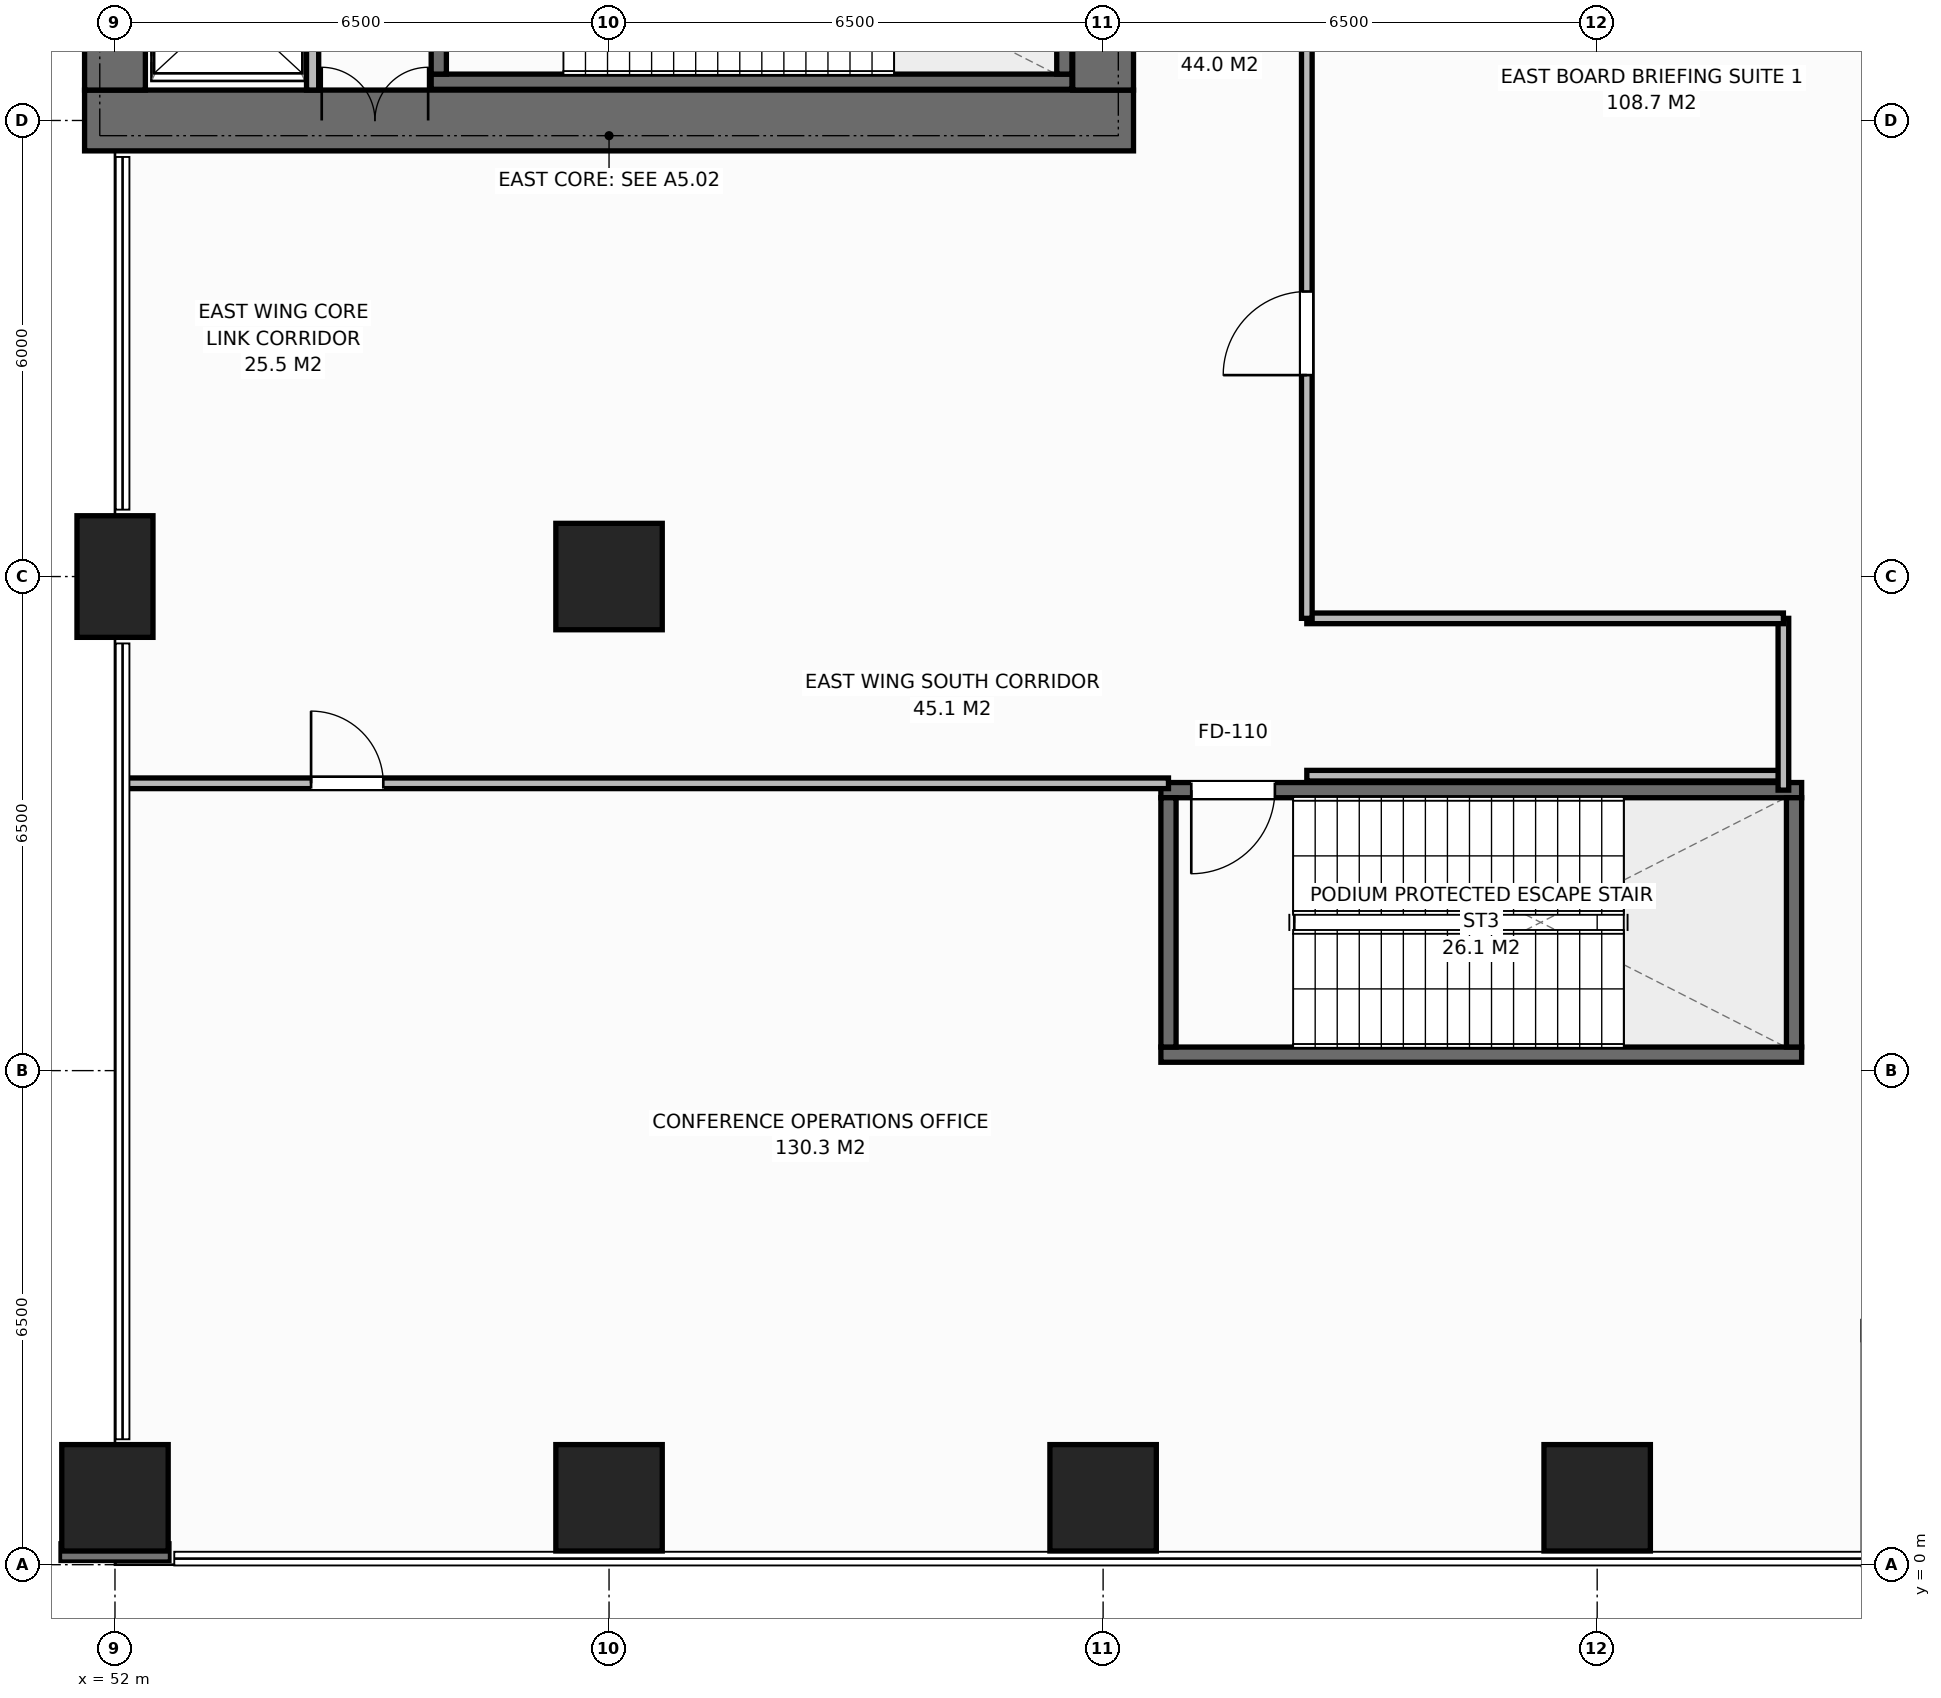
"""IFC4 building model, lengths in metres.
Left out: names, types, materials, properties, quantities, classifications, styles, units other than length and angle.
Written with IfcOpenShell. Run it as: python <this file> out.ifc"""

import sys

from ifc_helpers import new_model, si_unit, direction, frame, frame_2d, origin, origin_2d, place, context, subcontext, project, spatial, rectangle, extrude, element, fill, save


model = new_model("IFC4")
c1 = context("Model", 3, precision=1e-05, world=origin(), true_north=direction((0.0, 1.0)))
c2 = subcontext(c1, "Body", "Model", "MODEL_VIEW")
j1 = project(units=[si_unit("LENGTHUNIT", "METRE"), si_unit("PLANEANGLEUNIT", "RADIAN")], contexts=[c1])
p1 = place(None, origin())
s1 = spatial("IfcSite", under=j1, at=p1, CompositionType="ELEMENT")
p2 = place(p1, origin())
s2 = spatial("IfcBuilding", under=s1, at=p2, CompositionType="ELEMENT")
p3 = place(p2, frame((0.0, 0.0, 6.0)))
s3 = spatial("IfcBuildingStorey", under=s2, at=p3, CompositionType="ELEMENT", Elevation=6.0)
p4 = place(p3, frame((51.6, 19.0, 0.0), z_axis=(0.0, 0.0, 1.0), x_axis=(1.0, 0.0, 0.0)))
e1 = element("IfcWall", 1, at=p4, inside=s3, PredefinedType="SHEAR", context=c2, shape_type="SweptSolid", body=[
    extrude(rectangle(XDim=13.8, YDim=0.8, at=frame_2d((6.9, 0.0))), origin(), (0.0, 0.0, 1.0), 5.5),
])
p5 = place(p4, frame((3.12, 0.0, 0.0)))
e2 = element("IfcOpeningElement", 2, at=p5, cuts=e1, PredefinedType="OPENING", context=c2, shape_type="SweptSolid", body=[
    extrude(rectangle(XDim=1.4, YDim=2.2, at=frame_2d((0.7, 1.1))), frame((0.0, 0.41, 0.0), z_axis=(0.0, -1.0, 0.0), x_axis=(1.0, 0.0, 0.0)), (0.0, 0.0, 1.0), 0.82),
])
p6 = place(p3, frame((52.0, 19.4, 0.0), z_axis=(0.0, 0.0, 1.0), x_axis=(0.0, 1.0, 0.0)))
e3 = element("IfcWall", 3, at=p6, inside=s3, PredefinedType="SHEAR", context=c2, shape_type="SweptSolid", body=[
    extrude(rectangle(XDim=13.2, YDim=0.8, at=frame_2d((6.6, 0.0))), origin(), (0.0, 0.0, 1.0), 5.5),
])
p7 = place(p3, frame((65.0, 19.4, 0.0), z_axis=(0.0, 0.0, 1.0), x_axis=(0.0, 1.0, 0.0)))
e4 = element("IfcWall", 4, at=p7, inside=s3, PredefinedType="SHEAR", context=c2, shape_type="SweptSolid", body=[
    extrude(rectangle(XDim=13.2, YDim=0.8, at=frame_2d((6.6, 0.0))), origin(), (0.0, 0.0, 1.0), 5.5),
])
p8 = place(p7, frame((8.05, 0.0, 0.0)))
e5 = element("IfcOpeningElement", 5, at=p8, cuts=e4, PredefinedType="OPENING", context=c2, shape_type="SweptSolid", body=[
    extrude(rectangle(XDim=1.3, YDim=2.2, at=frame_2d((0.65, 1.1))), frame((0.0, 0.41, 0.0), z_axis=(0.0, -1.0, 0.0), x_axis=(1.0, 0.0, 0.0)), (0.0, 0.0, 1.0), 0.82),
])
p9 = place(p3, frame((56.16, 19.51, 0.0), z_axis=(0.0, 0.0, 1.0), x_axis=(1.0, 0.0, 0.0)))
e6 = element("IfcWall", 6, at=p9, inside=s3, PredefinedType="SHEAR", context=c2, shape_type="SweptSolid", body=[
    extrude(rectangle(XDim=8.43, YDim=0.2, at=frame_2d((4.215, 0.0))), origin(), (0.0, 0.0, 1.0), 5.5),
])
for number, where, z_axis, x_axis in (
    (7, (56.26, 19.61, 0.0), (0.0, 0.0, 1.0), (0.0, 1.0, 0.0)),
    (8, (64.49, 19.61, 0.0), (0.0, 0.0, 1.0), (0.0, 1.0, 0.0)),
):
    element("IfcWall", number, at=place(p3, frame(where, z_axis=z_axis, x_axis=x_axis)), inside=s3, PredefinedType="SHEAR", context=c2, shape_type="SweptSolid", body=[
        extrude(rectangle(XDim=3.28, YDim=0.2, at=frame_2d((1.64, 0.0))), origin(), (0.0, 0.0, 1.0), 5.5),
    ])
p10 = place(p3, frame((65.76, 6.71, 0.0), z_axis=(0.0, 0.0, 1.0), x_axis=(1.0, 0.0, 0.0)))
e9 = element("IfcWall", 9, at=p10, inside=s3, PredefinedType="SHEAR", context=c2, shape_type="SweptSolid", body=[
    extrude(rectangle(XDim=8.43, YDim=0.2, at=frame_2d((4.215, 0.0))), origin(), (0.0, 0.0, 1.0), 5.5),
])
p11 = place(p3, frame((65.76, 10.19, 0.0), z_axis=(0.0, 0.0, 1.0), x_axis=(1.0, 0.0, 0.0)))
e10 = element("IfcWall", 10, at=p11, inside=s3, PredefinedType="SHEAR", context=c2, shape_type="SweptSolid", body=[
    extrude(rectangle(XDim=8.43, YDim=0.2, at=frame_2d((4.215, 0.0))), origin(), (0.0, 0.0, 1.0), 5.5),
])
p12 = place(p11, frame((0.4, 0.0, 0.0)))
e11 = element("IfcOpeningElement", 11, at=p12, cuts=e10, PredefinedType="OPENING", context=c2, shape_type="SweptSolid", body=[
    extrude(rectangle(XDim=1.1, YDim=2.15, at=frame_2d((0.55, 1.075))), frame((0.0, 0.11, 0.0), z_axis=(0.0, -1.0, 0.0), x_axis=(1.0, 0.0, 0.0)), (0.0, 0.0, 1.0), 0.22),
])
for number, where, z_axis, x_axis in (
    (12, (65.86, 6.81, 0.0), (0.0, 0.0, 1.0), (0.0, 1.0, 0.0)),
    (13, (74.09, 6.81, 0.0), (0.0, 0.0, 1.0), (0.0, 1.0, 0.0)),
):
    element("IfcWall", number, at=place(p3, frame(where, z_axis=z_axis, x_axis=x_axis)), inside=s3, PredefinedType="SHEAR", context=c2, shape_type="SweptSolid", body=[
        extrude(rectangle(XDim=3.28, YDim=0.2, at=frame_2d((1.64, 0.0))), origin(), (0.0, 0.0, 1.0), 5.5),
    ])
p13 = place(p3, frame((58.5, 13.0, 0.0), z_axis=(0.0, 0.0, 1.0), x_axis=(1.0, 0.0, 0.0)))
e14 = element("IfcColumn", 14, at=p13, inside=s3, PredefinedType="COLUMN", context=c2, shape_type="SweptSolid", body=[
    extrude(rectangle(XDim=1.4, YDim=1.4, at=origin_2d()), origin(), (0.0, 0.0, 1.0), 5.5),
])
p14 = place(p3, frame((52.0, 13.0, 0.0), z_axis=(0.0, 0.0, 1.0), x_axis=(1.0, 0.0, 0.0)))
e15 = element("IfcColumn", 15, at=p14, inside=s3, PredefinedType="PILASTER", context=c2, shape_type="SweptSolid", body=[
    extrude(rectangle(XDim=1.0, YDim=1.6, at=origin_2d()), origin(), (0.0, 0.0, 1.0), 5.5),
])
for number, where, z_axis, x_axis in (
    (16, (52.0, 0.88, 0.0), (0.0, 0.0, 1.0), (1.0, 0.0, 0.0)),
    (17, (58.5, 0.88, 0.0), (0.0, 0.0, 1.0), (1.0, 0.0, 0.0)),
    (18, (65.0, 0.88, 0.0), (0.0, 0.0, 1.0), (1.0, 0.0, 0.0)),
    (19, (71.5, 0.88, 0.0), (0.0, 0.0, 1.0), (1.0, 0.0, 0.0)),
):
    element("IfcColumn", number, at=place(p3, frame(where, z_axis=z_axis, x_axis=x_axis)), inside=s3, PredefinedType="COLUMN", context=c2, shape_type="SweptSolid", body=[
        extrude(rectangle(XDim=1.4, YDim=1.4, at=origin_2d()), origin(), (0.0, 0.0, 1.0), 5.5),
    ])
p15 = place(p3, frame((54.6, 19.4, 0.0), z_axis=(0.0, 0.0, 1.0), x_axis=(0.0, 1.0, 0.0)))
e20 = element("IfcWall", 20, at=p15, inside=s3, PredefinedType="STANDARD", context=c2, shape_type="SweptSolid", body=[
    extrude(rectangle(XDim=13.2, YDim=0.16, at=frame_2d((6.6, 0.0))), origin(), (0.0, 0.0, 1.0), 5.22),
])
p16 = place(p15, frame((0.55, 0.0, 0.0)))
e21 = element("IfcOpeningElement", 21, at=p16, cuts=e20, PredefinedType="OPENING", context=c2, shape_type="SweptSolid", body=[
    extrude(rectangle(XDim=1.1, YDim=2.2, at=frame_2d((0.55, 1.1))), frame((0.0, 0.09, 0.0), z_axis=(0.0, -1.0, 0.0), x_axis=(1.0, 0.0, 0.0)), (0.0, 0.0, 1.0), 0.18),
])
p17 = place(p15, frame((2.7, 0.0, 0.0)))
e22 = element("IfcOpeningElement", 22, at=p17, cuts=e20, PredefinedType="OPENING", context=c2, shape_type="SweptSolid", body=[
    extrude(rectangle(XDim=1.1, YDim=2.2, at=frame_2d((0.55, 1.1))), frame((0.0, 0.09, 0.0), z_axis=(0.0, -1.0, 0.0), x_axis=(1.0, 0.0, 0.0)), (0.0, 0.0, 1.0), 0.18),
])
p18 = place(p3, frame((67.68, 10.38, 0.0), z_axis=(0.0, 0.0, 1.0), x_axis=(1.0, 0.0, 0.0)))
e23 = element("IfcWall", 23, at=p18, inside=s3, PredefinedType="PARTITIONING", context=c2, shape_type="SweptSolid", body=[
    extrude(rectangle(XDim=6.27, YDim=0.14, at=frame_2d((3.135, 0.0))), origin(), (0.0, 0.0, 1.0), 5.22),
])
p19 = place(p3, frame((73.95, 10.19, 0.0), z_axis=(0.0, 0.0, 1.0), x_axis=(0.0, 1.0, 0.0)))
e24 = element("IfcWall", 24, at=p19, inside=s3, PredefinedType="PARTITIONING", context=c2, shape_type="SweptSolid", body=[
    extrude(rectangle(XDim=2.26, YDim=0.14, at=frame_2d((1.13, 0.0))), origin(), (0.0, 0.0, 1.0), 5.22),
])
p20 = place(p3, frame((67.68, 12.45, 0.0), z_axis=(0.0, 0.0, 1.0), x_axis=(1.0, 0.0, 0.0)))
e25 = element("IfcWall", 25, at=p20, inside=s3, PredefinedType="PARTITIONING", context=c2, shape_type="SweptSolid", body=[
    extrude(rectangle(XDim=6.27, YDim=0.14, at=frame_2d((3.135, 0.0))), origin(), (0.0, 0.0, 1.0), 5.22),
])
p21 = place(p3, frame((67.68, 12.45, 0.0), z_axis=(0.0, 0.0, 1.0), x_axis=(0.0, 1.0, 0.0)))
e26 = element("IfcWall", 26, at=p21, inside=s3, PredefinedType="PARTITIONING", context=c2, shape_type="SweptSolid", body=[
    extrude(rectangle(XDim=11.45, YDim=0.14, at=frame_2d((5.725, 0.0))), origin(), (0.0, 0.0, 1.0), 5.22),
])
p22 = place(p21, frame((3.2, 0.0, 0.0)))
e27 = element("IfcOpeningElement", 27, at=p22, cuts=e26, PredefinedType="OPENING", context=c2, shape_type="SweptSolid", body=[
    extrude(rectangle(XDim=1.1, YDim=2.15, at=frame_2d((0.55, 1.075))), frame((0.0, 0.08, 0.0), z_axis=(0.0, -1.0, 0.0), x_axis=(1.0, 0.0, 0.0)), (0.0, 0.0, 1.0), 0.16),
])
p23 = place(p3, frame((52.08, 10.28, 0.0), z_axis=(0.0, 0.0, 1.0), x_axis=(1.0, 0.0, 0.0)))
e28 = element("IfcWall", 28, at=p23, inside=s3, PredefinedType="PARTITIONING", context=c2, shape_type="SweptSolid", body=[
    extrude(rectangle(XDim=13.78, YDim=0.14, at=frame_2d((6.89, 0.0))), origin(), (0.0, 0.0, 1.0), 5.22),
])
p24 = place(p23, frame((2.5, 0.0, 0.0)))
e29 = element("IfcOpeningElement", 29, at=p24, cuts=e28, PredefinedType="OPENING", context=c2, shape_type="SweptSolid", body=[
    extrude(rectangle(XDim=0.95, YDim=2.15, at=frame_2d((0.475, 1.075))), frame((0.0, 0.08, 0.0), z_axis=(0.0, -1.0, 0.0), x_axis=(1.0, 0.0, 0.0)), (0.0, 0.0, 1.0), 0.16),
])
p25 = place(p5, origin())
e30 = element("IfcDoor", 30, at=p25, inside=s3, OperationType="DOUBLE_DOOR_SINGLE_SWING", PredefinedType="DOOR", context=c2, shape_type="SweptSolid", body=[
    extrude(rectangle(XDim=1.4, YDim=2.2, at=frame_2d((0.7, 1.1))), frame((0.0, 0.125, 0.0), z_axis=(0.0, -1.0, 0.0), x_axis=(1.0, 0.0, 0.0)), (0.0, 0.0, 1.0), 0.05),
])
fill(e2, e30)
p26 = place(p12, origin())
e31 = element("IfcDoor", 31, at=p26, inside=s3, OperationType="SINGLE_SWING_RIGHT", PredefinedType="DOOR", context=c2, shape_type="SweptSolid", body=[
    extrude(rectangle(XDim=1.1, YDim=2.15, at=frame_2d((0.55, 1.075))), frame((0.0, 0.025, 0.0), z_axis=(0.0, -1.0, 0.0), x_axis=(1.0, 0.0, 0.0)), (0.0, 0.0, 1.0), 0.05),
])
fill(e11, e31)
p27 = place(p22, origin())
e32 = element("IfcDoor", 32, at=p27, inside=s3, OperationType="SINGLE_SWING_LEFT", PredefinedType="DOOR", context=c2, shape_type="SweptSolid", body=[
    extrude(rectangle(XDim=1.1, YDim=2.15, at=frame_2d((0.55, 1.075))), frame((0.0, 0.025, 0.0), z_axis=(0.0, -1.0, 0.0), x_axis=(1.0, 0.0, 0.0)), (0.0, 0.0, 1.0), 0.05),
])
fill(e27, e32)
p28 = place(p24, origin())
e33 = element("IfcDoor", 33, at=p28, inside=s3, OperationType="SINGLE_SWING_LEFT", PredefinedType="DOOR", context=c2, shape_type="SweptSolid", body=[
    extrude(rectangle(XDim=0.95, YDim=2.15, at=frame_2d((0.475, 1.075))), frame((0.0, 0.025, 0.0), z_axis=(0.0, -1.0, 0.0), x_axis=(1.0, 0.0, 0.0)), (0.0, 0.0, 1.0), 0.05),
])
fill(e29, e33)
save(model, sys.argv[1])
